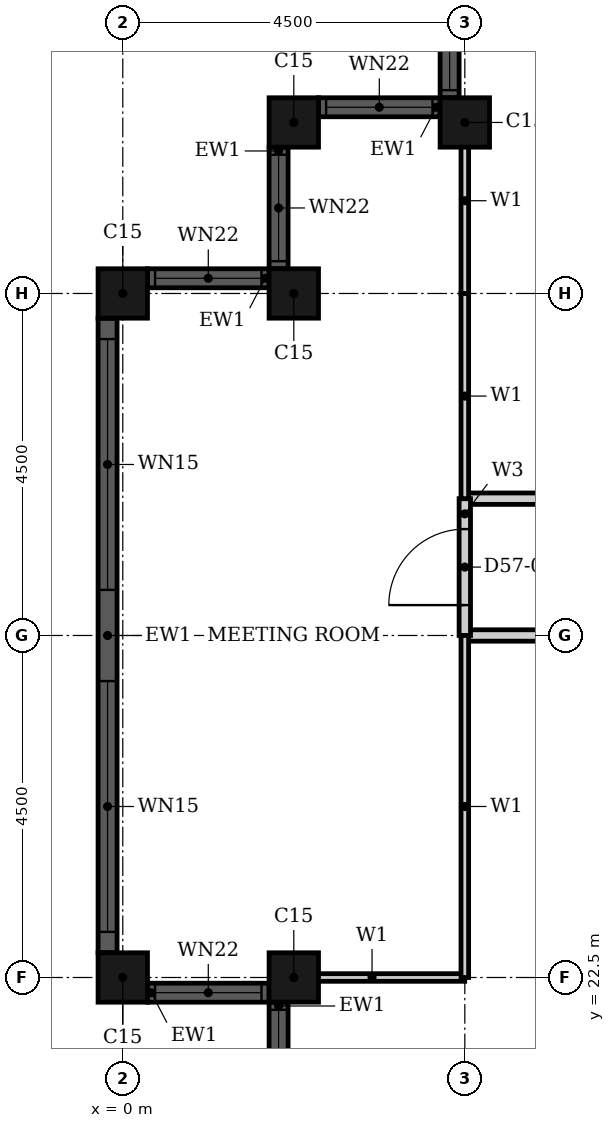
"""IFC4 building model, lengths in metres.
Left out: names, types, materials, properties, quantities, classifications, styles, units other than length and angle.
Written with IfcOpenShell. Run it as: python <this file> out.ifc"""

import sys

from ifc_helpers import new_model, si_unit, direction, frame, frame_2d, origin, origin_2d, place, context, subcontext, project, spatial, rectangle, hollow_rectangle, extrude, element, fill, save


model = new_model("IFC4")
c1 = context("Model", 3, precision=1e-05, world=origin(), true_north=direction((0.0, 1.0)))
c2 = subcontext(c1, "Body", "Model", "MODEL_VIEW")
j1 = project(units=[si_unit("LENGTHUNIT", "METRE"), si_unit("PLANEANGLEUNIT", "RADIAN")], contexts=[c1])
p1 = place(None, origin())
s1 = spatial("IfcSite", under=j1, at=p1, CompositionType="ELEMENT")
p2 = place(p1, origin())
s2 = spatial("IfcBuilding", under=s1, at=p2, CompositionType="ELEMENT")
p3 = place(p2, frame((0.0, 0.0, 225.7)))
s3 = spatial("IfcBuildingStorey", under=s2, at=p3, CompositionType="ELEMENT", Elevation=225.7)
for number, where, z_axis, x_axis in (
    (1, (4.5, 33.75, 0.0), (0.0, 0.0, 1.0), (1.0, 0.0, 0.0)),
    (2, (2.25, 33.75, 0.0), (0.0, 0.0, 1.0), (1.0, 0.0, 0.0)),
    (3, (2.25, 31.5, 0.0), (0.0, 0.0, 1.0), (1.0, 0.0, 0.0)),
    (4, (0.0, 31.5, 0.0), (0.0, 0.0, 1.0), (1.0, 0.0, 0.0)),
    (5, (0.0, 22.5, 0.0), (0.0, 0.0, 1.0), (1.0, 0.0, 0.0)),
    (6, (2.25, 22.5, 0.0), (0.0, 0.0, 1.0), (1.0, 0.0, 0.0)),
):
    element("IfcColumn", number, at=place(p3, frame(where, z_axis=z_axis, x_axis=x_axis)), inside=s3, PredefinedType="COLUMN", context=c2, shape_type="SweptSolid", body=[
        extrude(hollow_rectangle(XDim=0.65, YDim=0.65, WallThickness=0.021, at=origin_2d()), origin(), (0.0, 0.0, 1.0), 3.7),
    ])
p4 = place(p3, frame((4.3, 35.675, 0.0), z_axis=(0.0, 0.0, 1.0), x_axis=(0.0, -1.0, 0.0)))
e7 = element("IfcWall", 7, at=p4, inside=s3, PredefinedType="SOLIDWALL", context=c2, shape_type="SweptSolid", body=[
    extrude(rectangle(XDim=1.6, YDim=0.25, at=frame_2d((0.8, 0.0))), origin(), (0.0, 0.0, 1.0), 3.7),
])
p5 = place(p4, frame((0.1, 0.0, 0.9)))
e8 = element("IfcOpeningElement", 8, at=p5, cuts=e7, PredefinedType="OPENING", context=c2, shape_type="SweptSolid", body=[
    extrude(rectangle(XDim=1.4, YDim=1.85, at=frame_2d((0.7, 0.925))), frame((0.0, 0.135, 0.0), z_axis=(0.0, -1.0, 0.0), x_axis=(1.0, 0.0, 0.0)), (0.0, 0.0, 1.0), 0.27),
])
p6 = place(p3, frame((4.175, 33.95, 0.0), z_axis=(0.0, 0.0, 1.0), x_axis=(-1.0, 0.0, 0.0)))
e9 = element("IfcWall", 9, at=p6, inside=s3, PredefinedType="SOLIDWALL", context=c2, shape_type="SweptSolid", body=[
    extrude(rectangle(XDim=1.6, YDim=0.25, at=frame_2d((0.8, 0.0))), origin(), (0.0, 0.0, 1.0), 3.7),
])
p7 = place(p6, frame((0.1, 0.0, 0.9)))
e10 = element("IfcOpeningElement", 10, at=p7, cuts=e9, PredefinedType="OPENING", context=c2, shape_type="SweptSolid", body=[
    extrude(rectangle(XDim=1.4, YDim=1.85, at=frame_2d((0.7, 0.925))), frame((0.0, 0.135, 0.0), z_axis=(0.0, -1.0, 0.0), x_axis=(1.0, 0.0, 0.0)), (0.0, 0.0, 1.0), 0.27),
])
p8 = place(p3, frame((2.05, 33.425, 0.0), z_axis=(0.0, 0.0, 1.0), x_axis=(0.0, -1.0, 0.0)))
e11 = element("IfcWall", 11, at=p8, inside=s3, PredefinedType="SOLIDWALL", context=c2, shape_type="SweptSolid", body=[
    extrude(rectangle(XDim=1.6, YDim=0.25, at=frame_2d((0.8, 0.0))), origin(), (0.0, 0.0, 1.0), 3.7),
])
p9 = place(p8, frame((0.1, 0.0, 0.9)))
e12 = element("IfcOpeningElement", 12, at=p9, cuts=e11, PredefinedType="OPENING", context=c2, shape_type="SweptSolid", body=[
    extrude(rectangle(XDim=1.4, YDim=1.85, at=frame_2d((0.7, 0.925))), frame((0.0, 0.135, 0.0), z_axis=(0.0, -1.0, 0.0), x_axis=(1.0, 0.0, 0.0)), (0.0, 0.0, 1.0), 0.27),
])
p10 = place(p3, frame((1.925, 31.7, 0.0), z_axis=(0.0, 0.0, 1.0), x_axis=(-1.0, 0.0, 0.0)))
e13 = element("IfcWall", 13, at=p10, inside=s3, PredefinedType="SOLIDWALL", context=c2, shape_type="SweptSolid", body=[
    extrude(rectangle(XDim=1.6, YDim=0.25, at=frame_2d((0.8, 0.0))), origin(), (0.0, 0.0, 1.0), 3.7),
])
p11 = place(p10, frame((0.1, 0.0, 0.9)))
e14 = element("IfcOpeningElement", 14, at=p11, cuts=e13, PredefinedType="OPENING", context=c2, shape_type="SweptSolid", body=[
    extrude(rectangle(XDim=1.4, YDim=1.85, at=frame_2d((0.7, 0.925))), frame((0.0, 0.135, 0.0), z_axis=(0.0, -1.0, 0.0), x_axis=(1.0, 0.0, 0.0)), (0.0, 0.0, 1.0), 0.27),
])
p12 = place(p3, frame((-0.2, 31.175, 0.0), z_axis=(0.0, 0.0, 1.0), x_axis=(0.0, -1.0, 0.0)))
e15 = element("IfcWall", 15, at=p12, inside=s3, PredefinedType="SOLIDWALL", context=c2, shape_type="SweptSolid", body=[
    extrude(rectangle(XDim=8.35, YDim=0.25, at=frame_2d((4.175, 0.0))), origin(), (0.0, 0.0, 1.0), 3.7),
])
p13 = place(p12, frame((0.275, 0.0, 0.45)))
e16 = element("IfcOpeningElement", 16, at=p13, cuts=e15, PredefinedType="OPENING", context=c2, shape_type="SweptSolid", body=[
    extrude(rectangle(XDim=3.3, YDim=2.3, at=frame_2d((1.65, 1.15))), frame((0.0, 0.135, 0.0), z_axis=(0.0, -1.0, 0.0), x_axis=(1.0, 0.0, 0.0)), (0.0, 0.0, 1.0), 0.27),
])
p14 = place(p12, frame((4.775, 0.0, 0.45)))
e17 = element("IfcOpeningElement", 17, at=p14, cuts=e15, PredefinedType="OPENING", context=c2, shape_type="SweptSolid", body=[
    extrude(rectangle(XDim=3.3, YDim=2.3, at=frame_2d((1.65, 1.15))), frame((0.0, 0.135, 0.0), z_axis=(0.0, -1.0, 0.0), x_axis=(1.0, 0.0, 0.0)), (0.0, 0.0, 1.0), 0.27),
])
p15 = place(p3, frame((0.325, 22.3, 0.0), z_axis=(0.0, 0.0, 1.0), x_axis=(1.0, 0.0, 0.0)))
e18 = element("IfcWall", 18, at=p15, inside=s3, PredefinedType="SOLIDWALL", context=c2, shape_type="SweptSolid", body=[
    extrude(rectangle(XDim=1.6, YDim=0.25, at=frame_2d((0.8, 0.0))), origin(), (0.0, 0.0, 1.0), 3.7),
])
p16 = place(p15, frame((0.1, 0.0, 0.9)))
e19 = element("IfcOpeningElement", 19, at=p16, cuts=e18, PredefinedType="OPENING", context=c2, shape_type="SweptSolid", body=[
    extrude(rectangle(XDim=1.4, YDim=1.85, at=frame_2d((0.7, 0.925))), frame((0.0, 0.135, 0.0), z_axis=(0.0, -1.0, 0.0), x_axis=(1.0, 0.0, 0.0)), (0.0, 0.0, 1.0), 0.27),
])
p17 = place(p3, frame((2.05, 22.175, 0.0), z_axis=(0.0, 0.0, 1.0), x_axis=(0.0, -1.0, 0.0)))
e20 = element("IfcWall", 20, at=p17, inside=s3, PredefinedType="SOLIDWALL", context=c2, shape_type="SweptSolid", body=[
    extrude(rectangle(XDim=1.6, YDim=0.25, at=frame_2d((0.8, 0.0))), origin(), (0.0, 0.0, 1.0), 3.7),
])
p18 = place(p17, frame((0.1, 0.0, 0.9)))
e21 = element("IfcOpeningElement", 21, at=p18, cuts=e20, PredefinedType="OPENING", context=c2, shape_type="SweptSolid", body=[
    extrude(rectangle(XDim=1.4, YDim=1.85, at=frame_2d((0.7, 0.925))), frame((0.0, 0.135, 0.0), z_axis=(0.0, -1.0, 0.0), x_axis=(1.0, 0.0, 0.0)), (0.0, 0.0, 1.0), 0.27),
])
p19 = place(p3, frame((4.5, 27.0, 0.0), z_axis=(0.0, 0.0, 1.0), x_axis=(1.0, 0.0, 0.0)))
e22 = element("IfcWall", 22, at=p19, inside=s3, PredefinedType="PARTITIONING", context=c2, shape_type="SweptSolid", body=[
    extrude(rectangle(XDim=13.5, YDim=0.15, at=frame_2d((6.75, 0.0))), origin(), (0.0, 0.0, 1.0), 2.68),
])
p20 = place(p19, frame((5.35, 0.0, 0.0)))
e23 = element("IfcOpeningElement", 23, at=p20, cuts=e22, PredefinedType="OPENING", context=c2, shape_type="SweptSolid", body=[
    extrude(rectangle(XDim=1.0, YDim=2.1, at=frame_2d((0.5, 1.05))), frame((0.0, 0.085, 0.0), z_axis=(0.0, -1.0, 0.0), x_axis=(1.0, 0.0, 0.0)), (0.0, 0.0, 1.0), 0.17),
])
p21 = place(p3, frame((4.5, 28.8, 0.0), z_axis=(0.0, 0.0, 1.0), x_axis=(1.0, 0.0, 0.0)))
e24 = element("IfcWall", 24, at=p21, inside=s3, PredefinedType="PARTITIONING", context=c2, shape_type="SweptSolid", body=[
    extrude(rectangle(XDim=11.699, YDim=0.15, at=frame_2d((5.85, 0.0))), origin(), (0.0, 0.0, 1.0), 3.4),
])
p22 = place(p21, frame((4.0, 0.0, 0.0)))
e25 = element("IfcOpeningElement", 25, at=p22, cuts=e24, PredefinedType="OPENING", context=c2, shape_type="SweptSolid", body=[
    extrude(rectangle(XDim=1.0, YDim=2.1, at=frame_2d((0.5, 1.05))), frame((0.0, 0.085, 0.0), z_axis=(0.0, -1.0, 0.0), x_axis=(1.0, 0.0, 0.0)), (0.0, 0.0, 1.0), 0.17),
])
p23 = place(p3, frame((4.5, 27.0, 0.0), z_axis=(0.0, 0.0, 1.0), x_axis=(0.0, 1.0, 0.0)))
e26 = element("IfcWall", 26, at=p23, inside=s3, PredefinedType="PARTITIONING", context=c2, shape_type="SweptSolid", body=[
    extrude(rectangle(XDim=1.8, YDim=0.15, at=frame_2d((0.9, 0.0))), origin(), (0.0, 0.0, 1.0), 3.4),
])
p24 = place(p23, frame((0.4, 0.0, 0.0)))
e27 = element("IfcOpeningElement", 27, at=p24, cuts=e26, PredefinedType="OPENING", context=c2, shape_type="SweptSolid", body=[
    extrude(rectangle(XDim=1.0, YDim=2.1, at=frame_2d((0.5, 1.05))), frame((0.0, 0.085, 0.0), z_axis=(0.0, -1.0, 0.0), x_axis=(1.0, 0.0, 0.0)), (0.0, 0.0, 1.0), 0.17),
])
p25 = place(p3, frame((2.06, 22.5, 0.0), z_axis=(0.0, 0.0, 1.0), x_axis=(1.0, 0.0, 0.0)))
e28 = element("IfcWall", 28, at=p25, inside=s3, PredefinedType="PARTITIONING", context=c2, shape_type="SweptSolid", body=[
    extrude(rectangle(XDim=2.439, YDim=0.1, at=frame_2d((1.219, 0.0))), origin(), (0.0, 0.0, 1.0), 2.68),
])
p26 = place(p3, frame((4.5, 28.8, 0.0), z_axis=(0.0, 0.0, 1.0), x_axis=(0.0, 1.0, 0.0)))
e29 = element("IfcWall", 29, at=p26, inside=s3, PredefinedType="PARTITIONING", context=c2, shape_type="SweptSolid", body=[
    extrude(rectangle(XDim=2.7, YDim=0.1, at=frame_2d((1.35, 0.0))), origin(), (0.0, 0.0, 1.0), 3.4),
])
p27 = place(p3, frame((4.5, 31.501, 0.0), z_axis=(0.0, 0.0, 1.0), x_axis=(0.0, 1.0, 0.0)))
e30 = element("IfcWall", 30, at=p27, inside=s3, PredefinedType="PARTITIONING", context=c2, shape_type="SweptSolid", body=[
    extrude(rectangle(XDim=2.439, YDim=0.1, at=frame_2d((1.219, 0.0))), origin(), (0.0, 0.0, 1.0), 3.4),
])
p28 = place(p3, frame((4.5, 22.5, 0.0), z_axis=(0.0, 0.0, 1.0), x_axis=(0.0, 1.0, 0.0)))
e31 = element("IfcWall", 31, at=p28, inside=s3, PredefinedType="PARTITIONING", context=c2, shape_type="SweptSolid", body=[
    extrude(rectangle(XDim=4.5, YDim=0.1, at=frame_2d((2.25, 0.0))), origin(), (0.0, 0.0, 1.0), 3.4),
])
p29 = place(p5, origin())
e32 = element("IfcWindow", 32, at=p29, inside=s3, PartitioningType="SINGLE_PANEL", PredefinedType="WINDOW", context=c2, shape_type="SweptSolid", body=[
    extrude(rectangle(XDim=1.4, YDim=1.85, at=frame_2d((0.7, 0.925))), frame((0.0, 0.03, 0.0), z_axis=(0.0, -1.0, 0.0), x_axis=(1.0, 0.0, 0.0)), (0.0, 0.0, 1.0), 0.06),
])
fill(e8, e32)
p30 = place(p7, origin())
e33 = element("IfcWindow", 33, at=p30, inside=s3, PartitioningType="SINGLE_PANEL", PredefinedType="WINDOW", context=c2, shape_type="SweptSolid", body=[
    extrude(rectangle(XDim=1.4, YDim=1.85, at=frame_2d((0.7, 0.925))), frame((0.0, 0.03, 0.0), z_axis=(0.0, -1.0, 0.0), x_axis=(1.0, 0.0, 0.0)), (0.0, 0.0, 1.0), 0.06),
])
fill(e10, e33)
p31 = place(p9, origin())
e34 = element("IfcWindow", 34, at=p31, inside=s3, PartitioningType="SINGLE_PANEL", PredefinedType="WINDOW", context=c2, shape_type="SweptSolid", body=[
    extrude(rectangle(XDim=1.4, YDim=1.85, at=frame_2d((0.7, 0.925))), frame((0.0, 0.03, 0.0), z_axis=(0.0, -1.0, 0.0), x_axis=(1.0, 0.0, 0.0)), (0.0, 0.0, 1.0), 0.06),
])
fill(e12, e34)
p32 = place(p11, origin())
e35 = element("IfcWindow", 35, at=p32, inside=s3, PartitioningType="SINGLE_PANEL", PredefinedType="WINDOW", context=c2, shape_type="SweptSolid", body=[
    extrude(rectangle(XDim=1.4, YDim=1.85, at=frame_2d((0.7, 0.925))), frame((0.0, 0.03, 0.0), z_axis=(0.0, -1.0, 0.0), x_axis=(1.0, 0.0, 0.0)), (0.0, 0.0, 1.0), 0.06),
])
fill(e14, e35)
p33 = place(p13, origin())
e36 = element("IfcWindow", 36, at=p33, inside=s3, PartitioningType="SINGLE_PANEL", PredefinedType="WINDOW", context=c2, shape_type="SweptSolid", body=[
    extrude(rectangle(XDim=3.3, YDim=2.3, at=frame_2d((1.65, 1.15))), frame((0.0, 0.03, 0.0), z_axis=(0.0, -1.0, 0.0), x_axis=(1.0, 0.0, 0.0)), (0.0, 0.0, 1.0), 0.06),
])
fill(e16, e36)
p34 = place(p14, origin())
e37 = element("IfcWindow", 37, at=p34, inside=s3, PartitioningType="SINGLE_PANEL", PredefinedType="WINDOW", context=c2, shape_type="SweptSolid", body=[
    extrude(rectangle(XDim=3.3, YDim=2.3, at=frame_2d((1.65, 1.15))), frame((0.0, 0.03, 0.0), z_axis=(0.0, -1.0, 0.0), x_axis=(1.0, 0.0, 0.0)), (0.0, 0.0, 1.0), 0.06),
])
fill(e17, e37)
p35 = place(p16, origin())
e38 = element("IfcWindow", 38, at=p35, inside=s3, PartitioningType="SINGLE_PANEL", PredefinedType="WINDOW", context=c2, shape_type="SweptSolid", body=[
    extrude(rectangle(XDim=1.4, YDim=1.85, at=frame_2d((0.7, 0.925))), frame((0.0, 0.03, 0.0), z_axis=(0.0, -1.0, 0.0), x_axis=(1.0, 0.0, 0.0)), (0.0, 0.0, 1.0), 0.06),
])
fill(e19, e38)
p36 = place(p18, origin())
e39 = element("IfcWindow", 39, at=p36, inside=s3, PartitioningType="SINGLE_PANEL", PredefinedType="WINDOW", context=c2, shape_type="SweptSolid", body=[
    extrude(rectangle(XDim=1.4, YDim=1.85, at=frame_2d((0.7, 0.925))), frame((0.0, 0.03, 0.0), z_axis=(0.0, -1.0, 0.0), x_axis=(1.0, 0.0, 0.0)), (0.0, 0.0, 1.0), 0.06),
])
fill(e21, e39)
p37 = place(p24, origin())
e40 = element("IfcDoor", 40, at=p37, inside=s3, OperationType="SINGLE_SWING_RIGHT", PredefinedType="DOOR", context=c2, shape_type="SweptSolid", body=[
    extrude(rectangle(XDim=1.0, YDim=2.1, at=frame_2d((0.5, 1.05))), frame((0.0, 0.025, 0.0), z_axis=(0.0, -1.0, 0.0), x_axis=(1.0, 0.0, 0.0)), (0.0, 0.0, 1.0), 0.05),
])
fill(e27, e40)
save(model, sys.argv[1])
